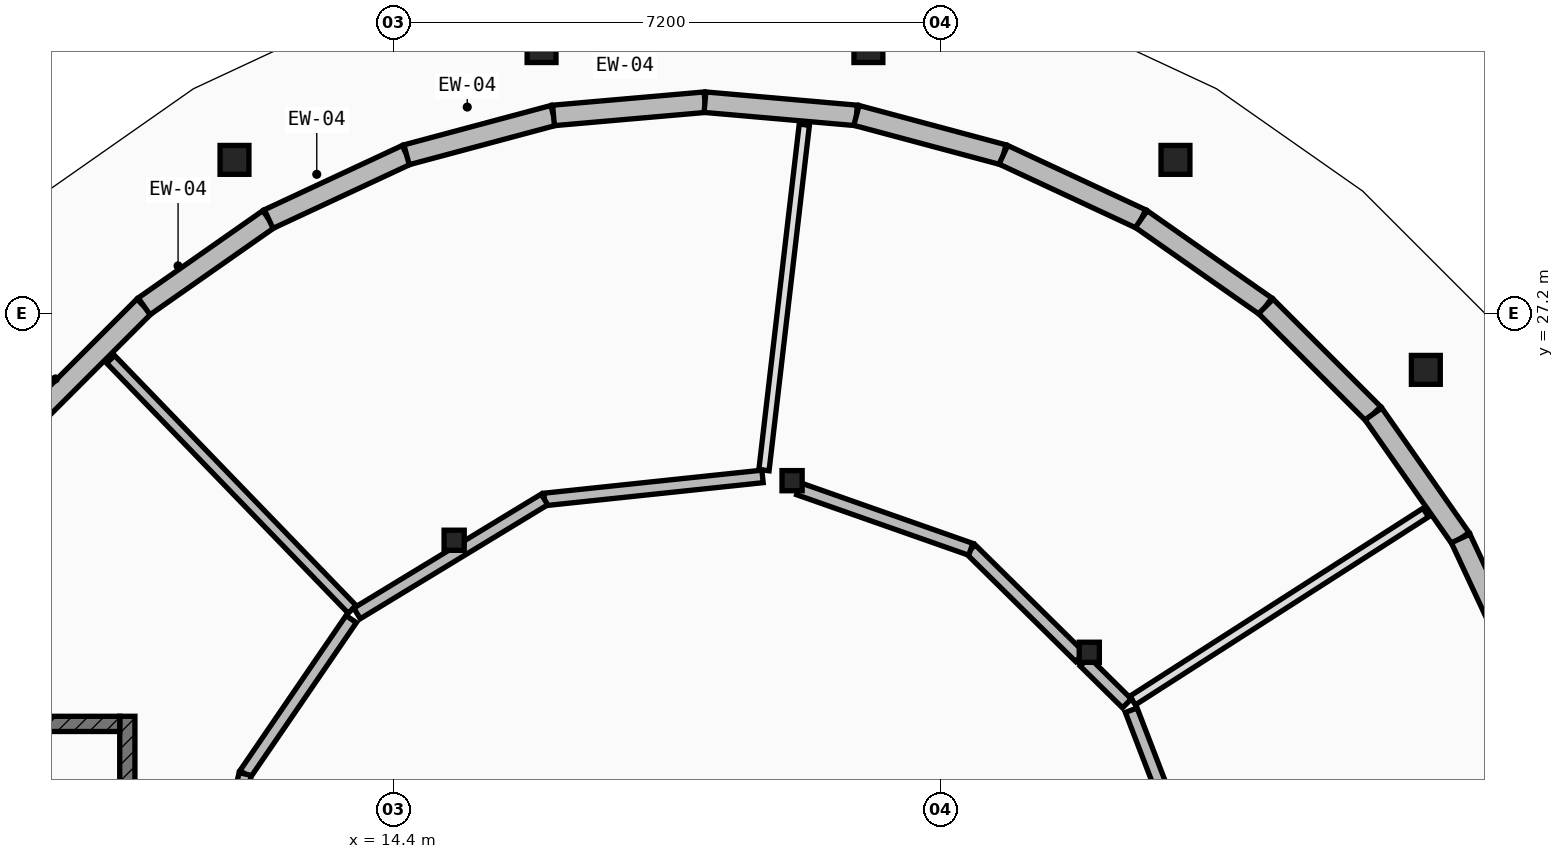
"""IFC4 building model, lengths in metres.
Left out: names, types, materials, properties, quantities, classifications, styles, units other than length and angle.
Written with IfcOpenShell. Run it as: python <this file> out.ifc"""

import sys

from ifc_helpers import new_model, si_unit, direction, frame, frame_2d, origin, origin_2d, place, context, subcontext, project, spatial, rectangle, circle, extrude, element, fill, save


model = new_model("IFC4")
c1 = context("Model", 3, precision=1e-05, world=origin(), true_north=direction((0.0, 1.0)))
c2 = subcontext(c1, "Body", "Model", "MODEL_VIEW")
j1 = project(units=[si_unit("LENGTHUNIT", "METRE"), si_unit("PLANEANGLEUNIT", "RADIAN")], contexts=[c1])
p1 = place(None, origin())
s1 = spatial("IfcSite", under=j1, at=p1, CompositionType="ELEMENT")
p2 = place(p1, origin())
s2 = spatial("IfcBuilding", under=s1, at=p2, CompositionType="ELEMENT")
p3 = place(p2, frame((0.0, 0.0, 17.15)))
s3 = spatial("IfcBuildingStorey", under=s2, at=p3, CompositionType="ELEMENT", Elevation=17.15)
for number, where, z_axis, x_axis in (
    (1, (27.984, 26.458, 0.0), (0.0, 0.0, 1.0), (1.0, 0.0, 0.0)),
    (2, (24.69, 29.221, 0.0), (0.0, 0.0, 1.0), (1.0, 0.0, 0.0)),
    (3, (20.65, 30.692, 0.0), (0.0, 0.0, 1.0), (1.0, 0.0, 0.0)),
    (4, (16.35, 30.692, 0.0), (0.0, 0.0, 1.0), (1.0, 0.0, 0.0)),
    (5, (12.31, 29.221, 0.0), (0.0, 0.0, 1.0), (1.0, 0.0, 0.0)),
):
    element("IfcColumn", number, at=place(p3, frame(where, z_axis=z_axis, x_axis=x_axis)), inside=s3, PredefinedType="PILASTER", context=c2, shape_type="SweptSolid", body=[
        extrude(circle(Radius=0.19, at=origin_2d()), origin(), (0.0, 0.0, 1.0), 4.2),
    ])
for number, where, z_axis, x_axis in (
    (6, (23.556, 22.742, 0.0), (0.0, 0.0, 1.0), (1.0, 0.0, 0.0)),
    (7, (19.646, 25.0, 0.0), (0.0, 0.0, 1.0), (1.0, 0.0, 0.0)),
    (8, (15.2, 24.216, 0.0), (0.0, 0.0, 1.0), (1.0, 0.0, 0.0)),
):
    element("IfcColumn", number, at=place(p3, frame(where, z_axis=z_axis, x_axis=x_axis)), inside=s3, PredefinedType="COLUMN", context=c2, shape_type="SweptSolid", body=[
        extrude(rectangle(XDim=0.265, YDim=0.265, at=origin_2d()), origin(), (0.0, 0.0, 1.0), 4.2),
    ])
p4 = place(p3, frame((9.706, 25.879, 0.0), z_axis=(0.0, 0.0, 1.0), x_axis=(0.707106781187, 0.707106781187, 0.0)))
e9 = element("IfcWall", 9, at=p4, inside=s3, PredefinedType="ELEMENTEDWALL", context=c2, shape_type="SweptSolid", body=[
    extrude(rectangle(XDim=2.001, YDim=0.27, at=frame_2d((1.0, 0.0))), origin(), (0.0, 0.0, 1.0), 3.314),
])
p5 = place(p4, frame((0.351, 0.0, 0.85)))
e10 = element("IfcOpeningElement", 10, at=p5, cuts=e9, PredefinedType="OPENING", context=c2, shape_type="SweptSolid", body=[
    extrude(rectangle(XDim=1.3, YDim=1.4, at=frame_2d((0.65, 0.7))), frame((0.0, 0.145, 0.0), z_axis=(0.0, -1.0, 0.0), x_axis=(1.0, 0.0, 0.0)), (0.0, 0.0, 1.0), 0.29),
])
p6 = place(p3, frame((11.121, 27.294, 0.0), z_axis=(0.0, 0.0, 1.0), x_axis=(0.819065655169, 0.573699793029, 0.0)))
e11 = element("IfcWall", 11, at=p6, inside=s3, PredefinedType="ELEMENTEDWALL", context=c2, shape_type="SweptSolid", body=[
    extrude(rectangle(XDim=2.001, YDim=0.27, at=frame_2d((1.0, 0.0))), origin(), (0.0, 0.0, 1.0), 3.314),
])
p7 = place(p6, frame((0.351, 0.0, 0.85)))
e12 = element("IfcOpeningElement", 12, at=p7, cuts=e11, PredefinedType="OPENING", context=c2, shape_type="SweptSolid", body=[
    extrude(rectangle(XDim=1.3, YDim=1.7, at=frame_2d((0.65, 0.85))), frame((0.0, 0.145, 0.0), z_axis=(0.0, -1.0, 0.0), x_axis=(1.0, 0.0, 0.0)), (0.0, 0.0, 1.0), 0.29),
])
p8 = place(p3, frame((12.76, 28.442, 0.0), z_axis=(0.0, 0.0, 1.0), x_axis=(0.906245451167, 0.422751915713, 0.0)))
e13 = element("IfcWall", 13, at=p8, inside=s3, PredefinedType="ELEMENTEDWALL", context=c2, shape_type="SweptSolid", body=[
    extrude(rectangle(XDim=2.002, YDim=0.27, at=frame_2d((1.001, 0.0))), origin(), (0.0, 0.0, 1.0), 3.314),
])
p9 = place(p8, frame((0.351, 0.0, 0.85)))
e14 = element("IfcOpeningElement", 14, at=p9, cuts=e13, PredefinedType="OPENING", context=c2, shape_type="SweptSolid", body=[
    extrude(rectangle(XDim=1.3, YDim=2.0, at=frame_2d((0.65, 1.0))), frame((0.0, 0.145, 0.0), z_axis=(0.0, -1.0, 0.0), x_axis=(1.0, 0.0, 0.0)), (0.0, 0.0, 1.0), 0.29),
])
p10 = place(p3, frame((14.574, 29.288, 0.0), z_axis=(0.0, 0.0, 1.0), x_axis=(0.965944784715, 0.258748280927, 0.0)))
e15 = element("IfcWall", 15, at=p10, inside=s3, PredefinedType="ELEMENTEDWALL", context=c2, shape_type="SweptSolid", body=[
    extrude(rectangle(XDim=2.001, YDim=0.27, at=frame_2d((1.0, 0.0))), origin(), (0.0, 0.0, 1.0), 3.314),
])
p11 = place(p10, frame((0.351, 0.0, 0.7)))
e16 = element("IfcOpeningElement", 16, at=p11, cuts=e15, PredefinedType="OPENING", context=c2, shape_type="SweptSolid", body=[
    extrude(rectangle(XDim=1.3, YDim=2.3, at=frame_2d((0.65, 1.15))), frame((0.0, 0.145, 0.0), z_axis=(0.0, -1.0, 0.0), x_axis=(1.0, 0.0, 0.0)), (0.0, 0.0, 1.0), 0.29),
])
p12 = place(p3, frame((16.507, 29.806, 0.0), z_axis=(0.0, 0.0, 1.0), x_axis=(0.996207084861, 0.087014045266, 0.0)))
e17 = element("IfcWall", 17, at=p12, inside=s3, PredefinedType="ELEMENTEDWALL", context=c2, shape_type="SweptSolid", body=[
    extrude(rectangle(XDim=2.0, YDim=0.27, at=frame_2d((1.0, 0.0))), origin(), (0.0, 0.0, 1.0), 3.314),
])
p13 = place(p12, frame((0.34, 0.0, 0.85)))
e18 = element("IfcOpeningElement", 18, at=p13, cuts=e17, PredefinedType="OPENING", context=c2, shape_type="SweptSolid", body=[
    extrude(rectangle(XDim=1.32, YDim=1.55, at=frame_2d((0.66, 0.775))), frame((0.0, 0.145, 0.0), z_axis=(0.0, -1.0, 0.0), x_axis=(1.0, 0.0, 0.0)), (0.0, 0.0, 1.0), 0.29),
])
p14 = place(p3, frame((18.5, 29.98, 0.0), z_axis=(0.0, 0.0, 1.0), x_axis=(0.996207084861, -0.087014045266, 0.0)))
e19 = element("IfcWall", 19, at=p14, inside=s3, PredefinedType="ELEMENTEDWALL", context=c2, shape_type="SweptSolid", body=[
    extrude(rectangle(XDim=2.0, YDim=0.27, at=frame_2d((1.0, 0.0))), origin(), (0.0, 0.0, 1.0), 3.314),
])
p15 = place(p14, frame((0.325, 0.0, 0.85)))
e20 = element("IfcOpeningElement", 20, at=p15, cuts=e19, PredefinedType="OPENING", context=c2, shape_type="SweptSolid", body=[
    extrude(rectangle(XDim=1.35, YDim=1.55, at=frame_2d((0.675, 0.775))), frame((0.0, 0.145, 0.0), z_axis=(0.0, -1.0, 0.0), x_axis=(1.0, 0.0, 0.0)), (0.0, 0.0, 1.0), 0.29),
])
p16 = place(p3, frame((20.493, 29.806, 0.0), z_axis=(0.0, 0.0, 1.0), x_axis=(0.965944784715, -0.258748280927, 0.0)))
e21 = element("IfcWall", 21, at=p16, inside=s3, PredefinedType="ELEMENTEDWALL", context=c2, shape_type="SweptSolid", body=[
    extrude(rectangle(XDim=2.001, YDim=0.27, at=frame_2d((1.0, 0.0))), origin(), (0.0, 0.0, 1.0), 3.314),
])
p17 = place(p16, frame((0.326, 0.0, 0.85)))
e22 = element("IfcOpeningElement", 22, at=p17, cuts=e21, PredefinedType="OPENING", context=c2, shape_type="SweptSolid", body=[
    extrude(rectangle(XDim=1.35, YDim=1.85, at=frame_2d((0.675, 0.925))), frame((0.0, 0.145, 0.0), z_axis=(0.0, -1.0, 0.0), x_axis=(1.0, 0.0, 0.0)), (0.0, 0.0, 1.0), 0.29),
])
p18 = place(p3, frame((22.426, 29.288, 0.0), z_axis=(0.0, 0.0, 1.0), x_axis=(0.906245451167, -0.422751915713, 0.0)))
e23 = element("IfcWall", 23, at=p18, inside=s3, PredefinedType="ELEMENTEDWALL", context=c2, shape_type="SweptSolid", body=[
    extrude(rectangle(XDim=2.002, YDim=0.27, at=frame_2d((1.001, 0.0))), origin(), (0.0, 0.0, 1.0), 3.314),
])
p19 = place(p18, frame((0.326, 0.0, 0.85)))
e24 = element("IfcOpeningElement", 24, at=p19, cuts=e23, PredefinedType="OPENING", context=c2, shape_type="SweptSolid", body=[
    extrude(rectangle(XDim=1.35, YDim=2.15, at=frame_2d((0.675, 1.075))), frame((0.0, 0.145, 0.0), z_axis=(0.0, -1.0, 0.0), x_axis=(1.0, 0.0, 0.0)), (0.0, 0.0, 1.0), 0.29),
])
p20 = place(p3, frame((24.24, 28.442, 0.0), z_axis=(0.0, 0.0, 1.0), x_axis=(0.819065655169, -0.573699793029, 0.0)))
e25 = element("IfcWall", 25, at=p20, inside=s3, PredefinedType="ELEMENTEDWALL", context=c2, shape_type="SweptSolid", body=[
    extrude(rectangle(XDim=2.001, YDim=0.27, at=frame_2d((1.0, 0.0))), origin(), (0.0, 0.0, 1.0), 3.314),
])
p21 = place(p20, frame((0.311, 0.0, 0.85)))
e26 = element("IfcOpeningElement", 26, at=p21, cuts=e25, PredefinedType="OPENING", context=c2, shape_type="SweptSolid", body=[
    extrude(rectangle(XDim=1.38, YDim=1.7, at=frame_2d((0.69, 0.85))), frame((0.0, 0.145, 0.0), z_axis=(0.0, -1.0, 0.0), x_axis=(1.0, 0.0, 0.0)), (0.0, 0.0, 1.0), 0.29),
])
p22 = place(p3, frame((25.879, 27.294, 0.0), z_axis=(0.0, 0.0, 1.0), x_axis=(0.707106781187, -0.707106781187, 0.0)))
e27 = element("IfcWall", 27, at=p22, inside=s3, PredefinedType="ELEMENTEDWALL", context=c2, shape_type="SweptSolid", body=[
    extrude(rectangle(XDim=2.001, YDim=0.27, at=frame_2d((1.0, 0.0))), origin(), (0.0, 0.0, 1.0), 3.314),
])
p23 = place(p22, frame((0.591, 0.0, 0.85)))
e28 = element("IfcOpeningElement", 28, at=p23, cuts=e27, PredefinedType="OPENING", context=c2, shape_type="SweptSolid", body=[
    extrude(rectangle(XDim=0.82, YDim=1.45, at=frame_2d((0.41, 0.725))), frame((0.0, 0.145, 0.0), z_axis=(0.0, -1.0, 0.0), x_axis=(1.0, 0.0, 0.0)), (0.0, 0.0, 1.0), 0.29),
])
p24 = place(p3, frame((27.294, 25.879, 0.0), z_axis=(0.0, 0.0, 1.0), x_axis=(0.573699793029, -0.819065655169, 0.0)))
e29 = element("IfcWall", 29, at=p24, inside=s3, PredefinedType="ELEMENTEDWALL", context=c2, shape_type="SweptSolid", body=[
    extrude(rectangle(XDim=2.001, YDim=0.27, at=frame_2d((1.0, 0.0))), origin(), (0.0, 0.0, 1.0), 3.314),
])
p25 = place(p24, frame((0.591, 0.0, 0.85)))
e30 = element("IfcOpeningElement", 30, at=p25, cuts=e29, PredefinedType="OPENING", context=c2, shape_type="SweptSolid", body=[
    extrude(rectangle(XDim=0.82, YDim=1.45, at=frame_2d((0.41, 0.725))), frame((0.0, 0.145, 0.0), z_axis=(0.0, -1.0, 0.0), x_axis=(1.0, 0.0, 0.0)), (0.0, 0.0, 1.0), 0.29),
])
p26 = place(p3, frame((28.442, 24.24, 0.0), z_axis=(0.0, 0.0, 1.0), x_axis=(0.422751915713, -0.906245451167, 0.0)))
e31 = element("IfcWall", 31, at=p26, inside=s3, PredefinedType="ELEMENTEDWALL", context=c2, shape_type="SweptSolid", body=[
    extrude(rectangle(XDim=2.002, YDim=0.27, at=frame_2d((1.001, 0.0))), origin(), (0.0, 0.0, 1.0), 3.314),
])
p27 = place(p26, frame((0.591, 0.0, 0.85)))
e32 = element("IfcOpeningElement", 32, at=p27, cuts=e31, PredefinedType="OPENING", context=c2, shape_type="SweptSolid", body=[
    extrude(rectangle(XDim=0.82, YDim=1.45, at=frame_2d((0.41, 0.725))), frame((0.0, 0.145, 0.0), z_axis=(0.0, -1.0, 0.0), x_axis=(1.0, 0.0, 0.0)), (0.0, 0.0, 1.0), 0.29),
])
p28 = place(p3, frame((10.9, 15.1, 0.0), z_axis=(0.0, 0.0, 1.0), x_axis=(0.0, 1.0, 0.0)))
e33 = element("IfcWall", 33, at=p28, inside=s3, PredefinedType="SHEAR", context=c2, shape_type="SweptSolid", body=[
    extrude(rectangle(XDim=6.8, YDim=0.2, at=frame_2d((3.4, 0.0))), origin(), (0.0, 0.0, 1.0), 3.96),
])
p29 = place(p28, frame((0.38, 0.0, 0.0)))
e34 = element("IfcOpeningElement", 34, at=p29, cuts=e33, PredefinedType="OPENING", context=c2, shape_type="SweptSolid", body=[
    extrude(rectangle(XDim=1.1, YDim=2.15, at=frame_2d((0.55, 1.075))), frame((0.0, 0.11, 0.0), z_axis=(0.0, -1.0, 0.0), x_axis=(1.0, 0.0, 0.0)), (0.0, 0.0, 1.0), 0.22),
])
p30 = place(p3, frame((10.8, 21.8, 0.0), z_axis=(0.0, 0.0, 1.0), x_axis=(-1.0, 0.0, 0.0)))
e35 = element("IfcWall", 35, at=p30, inside=s3, PredefinedType="SHEAR", context=c2, shape_type="SweptSolid", body=[
    extrude(rectangle(XDim=2.9, YDim=0.2, at=frame_2d((1.45, 0.0))), origin(), (0.0, 0.0, 1.0), 3.96),
])
p31 = place(p3, frame((13.858, 23.307, 0.0), z_axis=(0.0, 0.0, 1.0), x_axis=(-0.694751659022, 0.719249700928, 0.0)))
e36 = element("IfcWall", 36, at=p31, inside=s3, PredefinedType="PARTITIONING", context=c2, shape_type="SweptSolid", body=[
    extrude(rectangle(XDim=4.574, YDim=0.145, at=frame_2d((2.287, 0.0))), origin(), (0.0, 0.0, 1.0), 3.279),
])
p32 = place(p3, frame((24.126, 22.107, 0.0), z_axis=(0.0, 0.0, 1.0), x_axis=(0.841804640469, 0.53978231472, 0.0)))
e37 = element("IfcWall", 37, at=p32, inside=s3, PredefinedType="PLUMBINGWALL", context=c2, shape_type="SweptSolid", body=[
    extrude(rectangle(XDim=4.582, YDim=0.135, at=frame_2d((2.291, 0.0))), origin(), (0.0, 0.0, 1.0), 3.279),
])
p33 = place(p3, frame((19.276, 25.138, 0.0), z_axis=(0.0, 0.0, 1.0), x_axis=(0.116014889471, 0.99324747441, 0.0)))
e38 = element("IfcWall", 38, at=p33, inside=s3, PredefinedType="PLUMBINGWALL", context=c2, shape_type="SweptSolid", body=[
    extrude(rectangle(XDim=4.577, YDim=0.135, at=frame_2d((2.289, 0.0))), origin(), (0.0, 0.0, 1.0), 3.279),
])
p34 = place(p3, frame((13.845, 23.179, 0.0), z_axis=(0.0, 0.0, 1.0), x_axis=(-0.564379150031, -0.825515702462, 0.0)))
e39 = element("IfcWall", 39, at=p34, inside=s3, PredefinedType="PARTITIONING", context=c2, shape_type="SweptSolid", body=[
    extrude(rectangle(XDim=2.47, YDim=0.165, at=frame_2d((1.235, 0.0))), origin(), (0.0, 0.0, 1.0), 3.279),
])
p35 = place(p34, frame((0.7, 0.0, 0.0)))
e40 = element("IfcOpeningElement", 40, at=p35, cuts=e39, PredefinedType="OPENING", context=c2, shape_type="SweptSolid", body=[
    extrude(rectangle(XDim=1.07, YDim=2.2, at=frame_2d((0.535, 1.1))), frame((0.0, 0.093, 0.0), z_axis=(0.0, -1.0, 0.0), x_axis=(1.0, 0.0, 0.0)), (0.0, 0.0, 1.0), 0.185),
])
p36 = place(p3, frame((12.451, 21.14, 0.0), z_axis=(0.0, 0.0, 1.0), x_axis=(-0.221300832748, -0.975205589312, 0.0)))
e41 = element("IfcWall", 41, at=p36, inside=s3, PredefinedType="PARTITIONING", context=c2, shape_type="SweptSolid", body=[
    extrude(rectangle(XDim=2.471, YDim=0.165, at=frame_2d((1.236, 0.0))), origin(), (0.0, 0.0, 1.0), 3.279),
])
p37 = place(p3, frame((24.995, 19.673, 0.0), z_axis=(0.0, 0.0, 1.0), x_axis=(-0.358959221796, 0.933353243465, 0.0)))
e42 = element("IfcWall", 42, at=p37, inside=s3, PredefinedType="PARTITIONING", context=c2, shape_type="SweptSolid", body=[
    extrude(rectangle(XDim=2.472, YDim=0.165, at=frame_2d((1.236, 0.0))), origin(), (0.0, 0.0, 1.0), 3.279),
])
p38 = place(p3, frame((24.051, 22.07, 0.0), z_axis=(0.0, 0.0, 1.0), x_axis=(-0.711623901059, 0.702560619051, 0.0)))
e43 = element("IfcWall", 43, at=p38, inside=s3, PredefinedType="PARTITIONING", context=c2, shape_type="SweptSolid", body=[
    extrude(rectangle(XDim=0.781, YDim=0.165, at=frame_2d((0.391, 0.0))), origin(), (0.0, 0.0, 1.0), 3.279),
])
p39 = place(p3, frame((23.434, 22.68, 0.0), z_axis=(0.0, 0.0, 1.0), x_axis=(-0.712049294093, 0.70212947722, 0.0)))
e44 = element("IfcWall", 44, at=p39, inside=s3, PredefinedType="PARTITIONING", context=c2, shape_type="SweptSolid", body=[
    extrude(rectangle(XDim=2.018, YDim=0.165, at=frame_2d((1.009, 0.0))), origin(), (0.0, 0.0, 1.0), 3.279),
])
p40 = place(p39, frame((0.559, 0.0, 0.0)))
e45 = element("IfcOpeningElement", 45, at=p40, cuts=e44, PredefinedType="OPENING", context=c2, shape_type="SweptSolid", body=[
    extrude(rectangle(XDim=0.9, YDim=2.1, at=frame_2d((0.45, 1.05))), frame((0.0, 0.093, 0.0), z_axis=(0.0, -1.0, 0.0), x_axis=(1.0, 0.0, 0.0)), (0.0, 0.0, 1.0), 0.185),
])
p41 = place(p3, frame((21.997, 24.097, 0.0), z_axis=(0.0, 0.0, 1.0), x_axis=(-0.943378428423, 0.331718466151, 0.0)))
e46 = element("IfcWall", 46, at=p41, inside=s3, PredefinedType="PARTITIONING", context=c2, shape_type="SweptSolid", body=[
    extrude(rectangle(XDim=2.4, YDim=0.165, at=frame_2d((1.2, 0.0))), origin(), (0.0, 0.0, 1.0), 3.279),
])
p42 = place(p3, frame((19.257, 25.056, 0.0), z_axis=(0.0, 0.0, 1.0), x_axis=(-0.994470622132, -0.105015149938, 0.0)))
e47 = element("IfcWall", 47, at=p42, inside=s3, PredefinedType="PARTITIONING", context=c2, shape_type="SweptSolid", body=[
    extrude(rectangle(XDim=2.885, YDim=0.165, at=frame_2d((1.442, 0.0))), origin(), (0.0, 0.0, 1.0), 3.279),
])
p43 = place(p42, frame((0.973, 0.0, 0.0)))
e48 = element("IfcOpeningElement", 48, at=p43, cuts=e47, PredefinedType="OPENING", context=c2, shape_type="SweptSolid", body=[
    extrude(rectangle(XDim=0.94, YDim=2.1, at=frame_2d((0.47, 1.05))), frame((0.0, 0.093, 0.0), z_axis=(0.0, -1.0, 0.0), x_axis=(1.0, 0.0, 0.0)), (0.0, 0.0, 1.0), 0.185),
])
p44 = place(p3, frame((16.388, 24.753, 0.0), z_axis=(0.0, 0.0, 1.0), x_axis=(-0.854492488108, -0.519463750196, 0.0)))
e49 = element("IfcWall", 49, at=p44, inside=s3, PredefinedType="PARTITIONING", context=c2, shape_type="SweptSolid", body=[
    extrude(rectangle(XDim=2.886, YDim=0.165, at=frame_2d((1.443, 0.0))), origin(), (0.0, 0.0, 1.0), 3.279),
])
p45 = place(p5, origin())
e50 = element("IfcWindow", 50, at=p45, inside=s3, PartitioningType="SINGLE_PANEL", PredefinedType="WINDOW", context=c2, shape_type="SweptSolid", body=[
    extrude(rectangle(XDim=1.3, YDim=1.4, at=frame_2d((0.65, 0.7))), frame((0.0, 0.03, 0.0), z_axis=(0.0, -1.0, 0.0), x_axis=(1.0, 0.0, 0.0)), (0.0, 0.0, 1.0), 0.06),
])
fill(e10, e50)
p46 = place(p7, origin())
e51 = element("IfcWindow", 51, at=p46, inside=s3, PartitioningType="SINGLE_PANEL", PredefinedType="WINDOW", context=c2, shape_type="SweptSolid", body=[
    extrude(rectangle(XDim=1.3, YDim=1.7, at=frame_2d((0.65, 0.85))), frame((0.0, 0.03, 0.0), z_axis=(0.0, -1.0, 0.0), x_axis=(1.0, 0.0, 0.0)), (0.0, 0.0, 1.0), 0.06),
])
fill(e12, e51)
p47 = place(p9, origin())
e52 = element("IfcWindow", 52, at=p47, inside=s3, PartitioningType="SINGLE_PANEL", PredefinedType="WINDOW", context=c2, shape_type="SweptSolid", body=[
    extrude(rectangle(XDim=1.3, YDim=2.0, at=frame_2d((0.65, 1.0))), frame((0.0, 0.03, 0.0), z_axis=(0.0, -1.0, 0.0), x_axis=(1.0, 0.0, 0.0)), (0.0, 0.0, 1.0), 0.06),
])
fill(e14, e52)
p48 = place(p11, origin())
e53 = element("IfcWindow", 53, at=p48, inside=s3, PartitioningType="SINGLE_PANEL", PredefinedType="WINDOW", context=c2, shape_type="SweptSolid", body=[
    extrude(rectangle(XDim=1.3, YDim=2.3, at=frame_2d((0.65, 1.15))), frame((0.0, 0.03, 0.0), z_axis=(0.0, -1.0, 0.0), x_axis=(1.0, 0.0, 0.0)), (0.0, 0.0, 1.0), 0.06),
])
fill(e16, e53)
p49 = place(p13, origin())
e54 = element("IfcWindow", 54, at=p49, inside=s3, PartitioningType="SINGLE_PANEL", PredefinedType="WINDOW", context=c2, shape_type="SweptSolid", body=[
    extrude(rectangle(XDim=1.32, YDim=1.55, at=frame_2d((0.66, 0.775))), frame((0.0, 0.03, 0.0), z_axis=(0.0, -1.0, 0.0), x_axis=(1.0, 0.0, 0.0)), (0.0, 0.0, 1.0), 0.06),
])
fill(e18, e54)
p50 = place(p15, origin())
e55 = element("IfcWindow", 55, at=p50, inside=s3, PartitioningType="SINGLE_PANEL", PredefinedType="WINDOW", context=c2, shape_type="SweptSolid", body=[
    extrude(rectangle(XDim=1.35, YDim=1.55, at=frame_2d((0.675, 0.775))), frame((0.0, 0.03, 0.0), z_axis=(0.0, -1.0, 0.0), x_axis=(1.0, 0.0, 0.0)), (0.0, 0.0, 1.0), 0.06),
])
fill(e20, e55)
p51 = place(p17, origin())
e56 = element("IfcWindow", 56, at=p51, inside=s3, PartitioningType="SINGLE_PANEL", PredefinedType="WINDOW", context=c2, shape_type="SweptSolid", body=[
    extrude(rectangle(XDim=1.35, YDim=1.85, at=frame_2d((0.675, 0.925))), frame((0.0, 0.03, 0.0), z_axis=(0.0, -1.0, 0.0), x_axis=(1.0, 0.0, 0.0)), (0.0, 0.0, 1.0), 0.06),
])
fill(e22, e56)
p52 = place(p19, origin())
e57 = element("IfcWindow", 57, at=p52, inside=s3, PartitioningType="SINGLE_PANEL", PredefinedType="WINDOW", context=c2, shape_type="SweptSolid", body=[
    extrude(rectangle(XDim=1.35, YDim=2.15, at=frame_2d((0.675, 1.075))), frame((0.0, 0.03, 0.0), z_axis=(0.0, -1.0, 0.0), x_axis=(1.0, 0.0, 0.0)), (0.0, 0.0, 1.0), 0.06),
])
fill(e24, e57)
p53 = place(p21, origin())
e58 = element("IfcWindow", 58, at=p53, inside=s3, PartitioningType="SINGLE_PANEL", PredefinedType="WINDOW", context=c2, shape_type="SweptSolid", body=[
    extrude(rectangle(XDim=1.38, YDim=1.7, at=frame_2d((0.69, 0.85))), frame((0.0, 0.03, 0.0), z_axis=(0.0, -1.0, 0.0), x_axis=(1.0, 0.0, 0.0)), (0.0, 0.0, 1.0), 0.06),
])
fill(e26, e58)
p54 = place(p23, origin())
e59 = element("IfcWindow", 59, at=p54, inside=s3, PartitioningType="SINGLE_PANEL", PredefinedType="WINDOW", context=c2, shape_type="SweptSolid", body=[
    extrude(rectangle(XDim=0.82, YDim=1.45, at=frame_2d((0.41, 0.725))), frame((0.0, 0.03, 0.0), z_axis=(0.0, -1.0, 0.0), x_axis=(1.0, 0.0, 0.0)), (0.0, 0.0, 1.0), 0.06),
])
fill(e28, e59)
p55 = place(p25, origin())
e60 = element("IfcWindow", 60, at=p55, inside=s3, PartitioningType="SINGLE_PANEL", PredefinedType="WINDOW", context=c2, shape_type="SweptSolid", body=[
    extrude(rectangle(XDim=0.82, YDim=1.45, at=frame_2d((0.41, 0.725))), frame((0.0, 0.03, 0.0), z_axis=(0.0, -1.0, 0.0), x_axis=(1.0, 0.0, 0.0)), (0.0, 0.0, 1.0), 0.06),
])
fill(e30, e60)
p56 = place(p27, origin())
e61 = element("IfcWindow", 61, at=p56, inside=s3, PartitioningType="SINGLE_PANEL", PredefinedType="WINDOW", context=c2, shape_type="SweptSolid", body=[
    extrude(rectangle(XDim=0.82, YDim=1.45, at=frame_2d((0.41, 0.725))), frame((0.0, 0.03, 0.0), z_axis=(0.0, -1.0, 0.0), x_axis=(1.0, 0.0, 0.0)), (0.0, 0.0, 1.0), 0.06),
])
fill(e32, e61)
p57 = place(p35, origin())
e62 = element("IfcDoor", 62, at=p57, inside=s3, OperationType="SINGLE_SWING_LEFT", PredefinedType="DOOR", context=c2, shape_type="SweptSolid", body=[
    extrude(rectangle(XDim=1.07, YDim=2.2, at=frame_2d((0.535, 1.1))), frame((0.0, 0.025, 0.0), z_axis=(0.0, -1.0, 0.0), x_axis=(1.0, 0.0, 0.0)), (0.0, 0.0, 1.0), 0.05),
])
fill(e40, e62)
p58 = place(p40, origin())
e63 = element("IfcDoor", 63, at=p58, inside=s3, OperationType="SINGLE_SWING_RIGHT", PredefinedType="DOOR", context=c2, shape_type="SweptSolid", body=[
    extrude(rectangle(XDim=0.9, YDim=2.1, at=frame_2d((0.45, 1.05))), frame((0.0, 0.025, 0.0), z_axis=(0.0, -1.0, 0.0), x_axis=(1.0, 0.0, 0.0)), (0.0, 0.0, 1.0), 0.05),
])
fill(e45, e63)
p59 = place(p43, origin())
e64 = element("IfcDoor", 64, at=p59, inside=s3, OperationType="SINGLE_SWING_LEFT", PredefinedType="DOOR", context=c2, shape_type="SweptSolid", body=[
    extrude(rectangle(XDim=0.94, YDim=2.1, at=frame_2d((0.47, 1.05))), frame((0.0, 0.025, 0.0), z_axis=(0.0, -1.0, 0.0), x_axis=(1.0, 0.0, 0.0)), (0.0, 0.0, 1.0), 0.05),
])
fill(e48, e64)
save(model, sys.argv[1])
